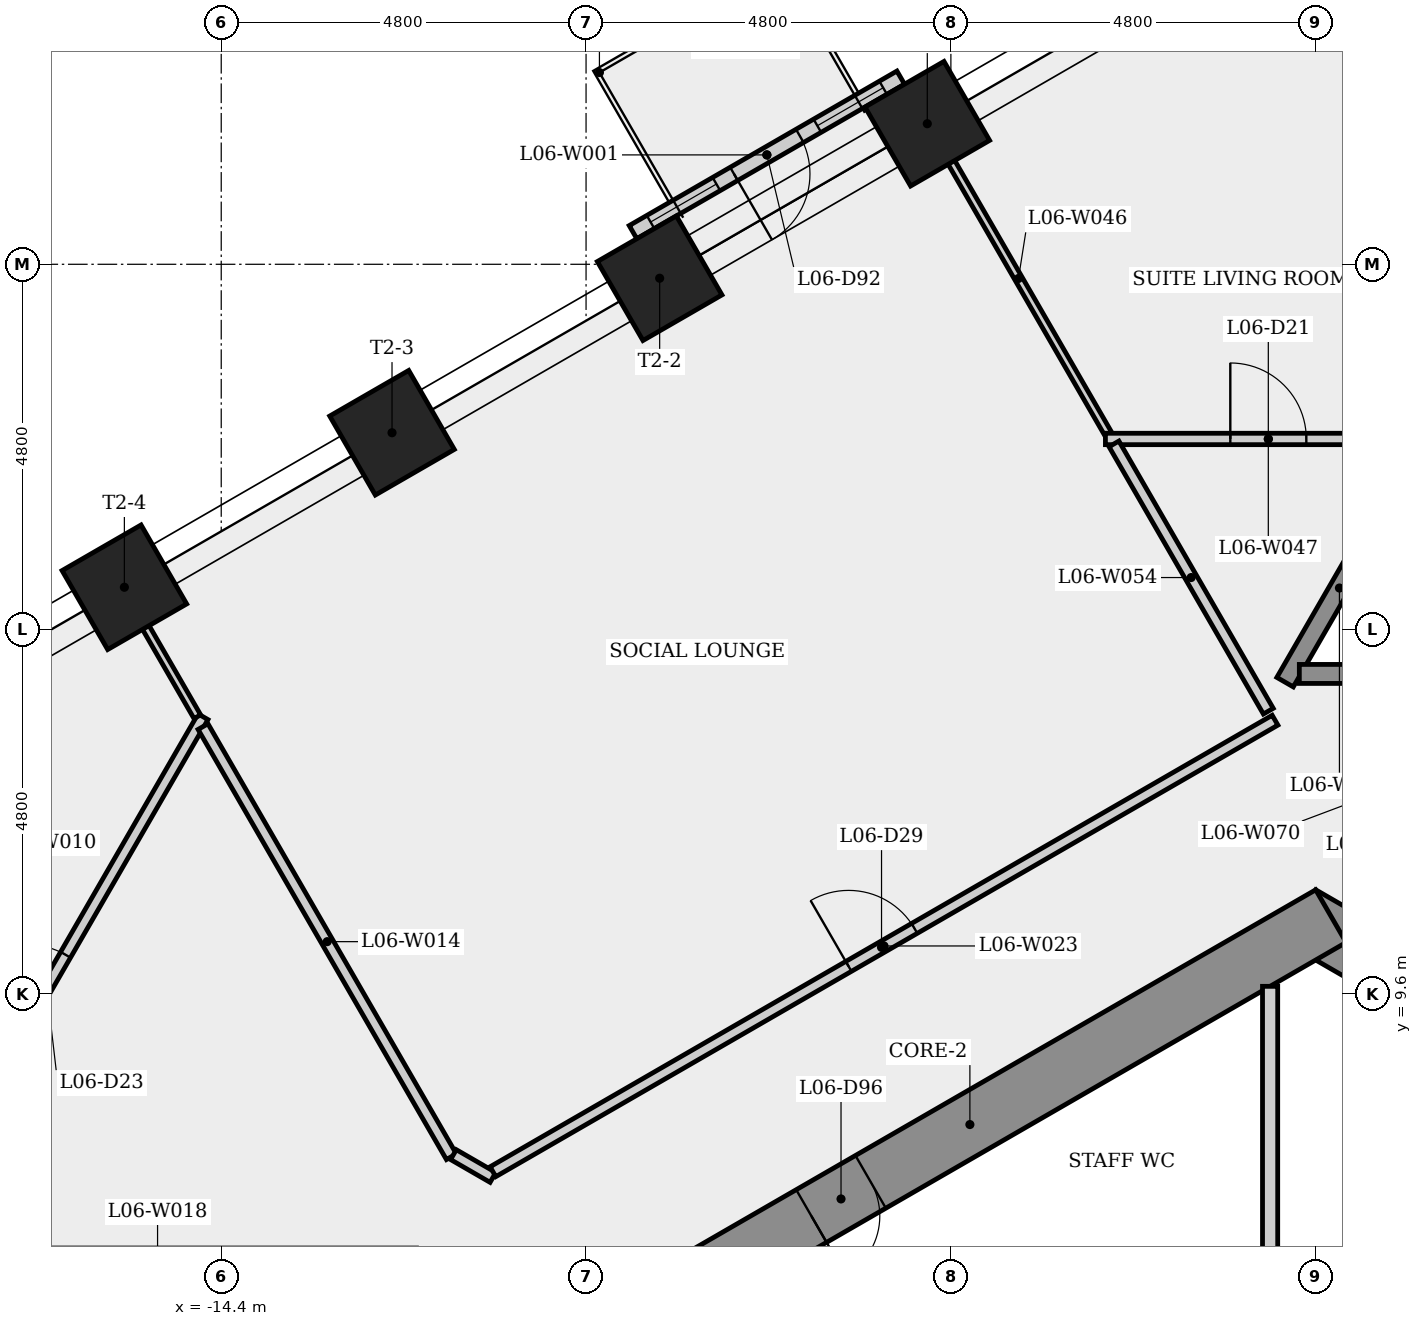
"""IFC4 building model, lengths in metres.
Left out: names, types, materials, properties, quantities, classifications, styles, units other than length and angle.
Written with IfcOpenShell. Run it as: python <this file> out.ifc"""

import sys

from ifc_helpers import new_model, si_unit, direction, frame, frame_2d, origin, origin_2d, place, context, subcontext, project, spatial, rectangle, extrude, element, fill, save


model = new_model("IFC4")
c1 = context("Model", 3, precision=1e-05, world=origin(), true_north=direction((0.0, 1.0)))
c2 = subcontext(c1, "Body", "Model", "MODEL_VIEW")
j1 = project(units=[si_unit("LENGTHUNIT", "METRE"), si_unit("PLANEANGLEUNIT", "RADIAN")], contexts=[c1])
p1 = place(None, origin())
s1 = spatial("IfcSite", under=j1, at=p1, CompositionType="ELEMENT")
p2 = place(p1, origin())
s2 = spatial("IfcBuilding", under=s1, at=p2, CompositionType="ELEMENT")
p3 = place(p2, frame((0.0, 0.0, 28.9)))
s3 = spatial("IfcBuildingStorey", under=s2, at=p3, CompositionType="ELEMENT", Elevation=28.9)
p4 = place(p3, frame((9.3, 5.138, 0.0), z_axis=(0.0, 0.0, 1.0), x_axis=(-0.866023993627, 0.500002442456, 0.0)))
e1 = element("IfcWall", 1, at=p4, inside=s3, PredefinedType="SHEAR", context=c2, shape_type="SweptSolid", body=[
    extrude(rectangle(XDim=10.97, YDim=0.8, at=frame_2d((5.485, 0.0))), origin(), (0.0, 0.0, 1.0), 3.4),
])
p5 = place(p4, frame((5.509, 0.0, 0.0)))
e2 = element("IfcOpeningElement", 2, at=p5, cuts=e1, PredefinedType="OPENING", context=c2, shape_type="SweptSolid", body=[
    extrude(rectangle(XDim=0.9, YDim=2.1, at=frame_2d((0.45, 1.05))), frame((0.0, 0.41, 0.0), z_axis=(0.0, -1.0, 0.0), x_axis=(1.0, 0.0, 0.0)), (0.0, 0.0, 1.0), 0.82),
])
p6 = place(p3, frame((0.2, 10.623, 0.0), z_axis=(0.0, 0.0, 1.0), x_axis=(-0.866023993627, -0.500002442456, 0.0)))
e3 = element("IfcWall", 3, at=p6, inside=s3, PredefinedType="SHEAR", context=c2, shape_type="SweptSolid", body=[
    extrude(rectangle(XDim=10.97, YDim=0.8, at=frame_2d((5.485, 0.0))), origin(), (0.0, 0.0, 1.0), 3.4),
])
p7 = place(p6, frame((6.993, 0.0, 0.0)))
e4 = element("IfcOpeningElement", 4, at=p7, cuts=e3, PredefinedType="OPENING", context=c2, shape_type="SweptSolid", body=[
    extrude(rectangle(XDim=0.9, YDim=2.1, at=frame_2d((0.45, 1.05))), frame((0.0, 0.41, 0.0), z_axis=(0.0, -1.0, 0.0), x_axis=(1.0, 0.0, 0.0)), (0.0, 0.0, 1.0), 0.82),
])
for number, where, z_axis, x_axis in (
    (5, (-5.11, 21.05, 0.0), (0.0, 0.0, 1.0), (-0.5, 0.866, 0.0)),
    (6, (-8.632, 19.017, 0.0), (0.0, 0.0, 1.0), (-0.5, 0.866, 0.0)),
    (7, (-12.153, 16.983, 0.0), (0.0, 0.0, 1.0), (-0.5, 0.866, 0.0)),
    (8, (-15.674, 14.95, 0.0), (0.0, 0.0, 1.0), (-0.5, 0.866, 0.0)),
):
    element("IfcColumn", number, at=place(p3, frame(where, z_axis=z_axis, x_axis=x_axis)), inside=s3, PredefinedType="COLUMN", context=c2, shape_type="SweptSolid", body=[
        extrude(rectangle(XDim=1.2, YDim=1.2, at=origin_2d()), origin(), (0.0, 0.0, 1.0), 3.4),
    ])
p8 = place(p3, frame((-5.46, 21.656, 0.0), z_axis=(0.0, 0.0, 1.0), x_axis=(-0.866021634107, -0.500006529216, 0.0)))
e9 = element("IfcWall", 9, at=p8, inside=s3, PredefinedType="SOLIDWALL", context=c2, shape_type="SweptSolid", body=[
    extrude(rectangle(XDim=4.067, YDim=0.2, at=frame_2d((2.033, 0.0))), origin(), (0.0, 0.0, 1.0), 3.4),
])
p9 = place(p8, frame((1.533, 0.0, 0.0)))
e10 = element("IfcOpeningElement", 10, at=p9, cuts=e9, PredefinedType="OPENING", context=c2, shape_type="SweptSolid", body=[
    extrude(rectangle(XDim=1.0, YDim=2.4, at=frame_2d((0.5, 1.2))), frame((0.0, 0.11, 0.0), z_axis=(0.0, -1.0, 0.0), x_axis=(1.0, 0.0, 0.0)), (0.0, 0.0, 1.0), 0.22),
])
p10 = place(p8, frame((0.267, 0.0, 0.9)))
e11 = element("IfcOpeningElement", 11, at=p10, cuts=e9, PredefinedType="OPENING", context=c2, shape_type="SweptSolid", body=[
    extrude(rectangle(XDim=1.0, YDim=1.5, at=frame_2d((0.5, 0.75))), frame((0.0, 0.11, 0.0), z_axis=(0.0, -1.0, 0.0), x_axis=(1.0, 0.0, 0.0)), (0.0, 0.0, 1.0), 0.22),
])
p11 = place(p8, frame((2.8, 0.0, 0.9)))
e12 = element("IfcOpeningElement", 12, at=p11, cuts=e9, PredefinedType="OPENING", context=c2, shape_type="SweptSolid", body=[
    extrude(rectangle(XDim=1.0, YDim=1.5, at=frame_2d((0.5, 0.75))), frame((0.0, 0.11, 0.0), z_axis=(0.0, -1.0, 0.0), x_axis=(1.0, 0.0, 0.0)), (0.0, 0.0, 1.0), 0.22),
])
p12 = place(p3, frame((-18.756, 6.116, 0.0), z_axis=(0.0, 0.0, 1.0), x_axis=(0.500020193662, 0.866013744654, 0.0)))
e13 = element("IfcWall", 13, at=p12, inside=s3, PredefinedType="PARTITIONING", context=c2, shape_type="SweptSolid", body=[
    extrude(rectangle(XDim=8.234, YDim=0.15, at=frame_2d((4.117, 0.0))), origin(), (0.0, 0.0, 1.0), 3.05),
])
p13 = place(p12, frame((3.617, 0.0, 0.0)))
e14 = element("IfcOpeningElement", 14, at=p13, cuts=e13, PredefinedType="OPENING", context=c2, shape_type="SweptSolid", body=[
    extrude(rectangle(XDim=1.0, YDim=2.1, at=frame_2d((0.5, 1.05))), frame((0.0, 0.085, 0.0), z_axis=(0.0, -1.0, 0.0), x_axis=(1.0, 0.0, 0.0)), (0.0, 0.0, 1.0), 0.17),
])
p14 = place(p3, frame((-15.692, 14.94, 0.0), z_axis=(0.0, 0.0, 1.0), x_axis=(0.499953038101, -0.866052515552, 0.0)))
e15 = element("IfcWall", 15, at=p14, inside=s3, PredefinedType="PARTITIONING", context=c2, shape_type="SweptSolid", body=[
    extrude(rectangle(XDim=1.955, YDim=0.1, at=frame_2d((0.978, 0.0))), origin(), (0.0, 0.0, 1.0), 3.05),
])
p15 = place(p3, frame((-14.639, 13.117, 0.0), z_axis=(0.0, 0.0, 1.0), x_axis=(0.500000581714, -0.866025067932, 0.0)))
e16 = element("IfcWall", 16, at=p15, inside=s3, PredefinedType="PARTITIONING", context=c2, shape_type="SweptSolid", body=[
    extrude(rectangle(XDim=6.535, YDim=0.15, at=frame_2d((3.267, 0.0))), origin(), (0.0, 0.0, 1.0), 3.05),
])
p16 = place(p3, frame((-11.344, 7.485, 0.0), z_axis=(0.0, 0.0, 1.0), x_axis=(0.866131372301, -0.499816412211, 0.0)))
e17 = element("IfcWall", 17, at=p16, inside=s3, PredefinedType="PARTITIONING", context=c2, shape_type="SweptSolid", body=[
    extrude(rectangle(XDim=0.6, YDim=0.15, at=frame_2d((0.3, 0.0))), origin(), (0.0, 0.0, 1.0), 3.05),
])
p17 = place(p3, frame((-10.825, 7.26, 0.0), z_axis=(0.0, 0.0, 1.0), x_axis=(0.866026819738, 0.499997547488, 0.0)))
e18 = element("IfcWall", 18, at=p17, inside=s3, PredefinedType="PARTITIONING", context=c2, shape_type="SweptSolid", body=[
    extrude(rectangle(XDim=11.882, YDim=0.15, at=frame_2d((5.941, 0.0))), origin(), (0.0, 0.0, 1.0), 3.05),
])
p18 = place(p17, frame((5.403, 0.0, 0.0)))
e19 = element("IfcOpeningElement", 19, at=p18, cuts=e18, PredefinedType="OPENING", context=c2, shape_type="SweptSolid", body=[
    extrude(rectangle(XDim=1.0, YDim=2.1, at=frame_2d((0.5, 1.05))), frame((0.0, 0.085, 0.0), z_axis=(0.0, -1.0, 0.0), x_axis=(1.0, 0.0, 0.0)), (0.0, 0.0, 1.0), 0.17),
])
p19 = place(p3, frame((-2.729, 16.967, 0.0), z_axis=(0.0, 0.0, 1.0), x_axis=(-0.500005632288, 0.866022151957, 0.0)))
e20 = element("IfcWall", 20, at=p19, inside=s3, PredefinedType="PARTITIONING", context=c2, shape_type="SweptSolid", body=[
    extrude(rectangle(XDim=4.727, YDim=0.1, at=frame_2d((2.363, 0.0))), origin(), (0.0, 0.0, 1.0), 3.05),
])
p20 = place(p3, frame((-2.767, 16.902, 0.0), z_axis=(0.0, 0.0, 1.0), x_axis=(1.0, 0.0, 0.0)))
e21 = element("IfcWall", 21, at=p20, inside=s3, PredefinedType="PARTITIONING", context=c2, shape_type="SweptSolid", body=[
    extrude(rectangle(XDim=4.286, YDim=0.15, at=frame_2d((2.143, 0.0))), origin(), (0.0, 0.0, 1.0), 3.05),
])
p21 = place(p20, frame((1.643, 0.0, 0.0)))
e22 = element("IfcOpeningElement", 22, at=p21, cuts=e21, PredefinedType="OPENING", context=c2, shape_type="SweptSolid", body=[
    extrude(rectangle(XDim=1.0, YDim=2.1, at=frame_2d((0.5, 1.05))), frame((0.0, 0.085, 0.0), z_axis=(0.0, -1.0, 0.0), x_axis=(1.0, 0.0, 0.0)), (0.0, 0.0, 1.0), 0.17),
])
p22 = place(p3, frame((-0.624, 13.32, 0.0), z_axis=(0.0, 0.0, 1.0), x_axis=(-0.499986114097, 0.866033420666, 0.0)))
e23 = element("IfcWall", 23, at=p22, inside=s3, PredefinedType="PARTITIONING", context=c2, shape_type="SweptSolid", body=[
    extrude(rectangle(XDim=4.061, YDim=0.15, at=frame_2d((2.031, 0.0))), origin(), (0.0, 0.0, 1.0), 3.05),
])
p23 = place(p3, frame((-0.6, 9.699, 0.0), z_axis=(0.0, 0.0, 1.0), x_axis=(0.0, -1.0, 0.0)))
e24 = element("IfcWall", 24, at=p23, inside=s3, PredefinedType="PARTITIONING", context=c2, shape_type="SweptSolid", body=[
    extrude(rectangle(XDim=4.425, YDim=0.2, at=frame_2d((2.212, 0.0))), origin(), (0.0, 0.0, 1.0), 3.05),
])
p24 = place(p3, frame((-0.403, 13.702, 0.0), z_axis=(0.0, 0.0, 1.0), x_axis=(0.499976111731, 0.866039195244, 0.0)))
e25 = element("IfcWall", 25, at=p24, inside=s3, PredefinedType="SHEAR", context=c2, shape_type="SweptSolid", body=[
    extrude(rectangle(XDim=2.861, YDim=0.25, at=frame_2d((1.43, 0.0))), origin(), (0.0, 0.0, 1.0), 3.05),
])
p25 = place(p3, frame((0.475, 13.81, 0.0), z_axis=(0.0, 0.0, 1.0), x_axis=(-1.0, 0.0, 0.0)))
e26 = element("IfcWall", 26, at=p25, inside=s3, PredefinedType="SHEAR", context=c2, shape_type="SweptSolid", body=[
    extrude(rectangle(XDim=0.691, YDim=0.25, at=frame_2d((0.345, 0.0))), origin(), (0.0, 0.0, 1.0), 3.4),
])
p26 = place(p9, origin())
e27 = element("IfcDoor", 27, at=p26, inside=s3, OperationType="SINGLE_SWING_RIGHT", PredefinedType="DOOR", context=c2, shape_type="SweptSolid", body=[
    extrude(rectangle(XDim=1.0, YDim=2.4, at=frame_2d((0.5, 1.2))), frame((0.0, 0.025, 0.0), z_axis=(0.0, -1.0, 0.0), x_axis=(1.0, 0.0, 0.0)), (0.0, 0.0, 1.0), 0.05),
])
fill(e10, e27)
p27 = place(p10, origin())
e28 = element("IfcWindow", 28, at=p27, inside=s3, PartitioningType="SINGLE_PANEL", PredefinedType="WINDOW", context=c2, shape_type="SweptSolid", body=[
    extrude(rectangle(XDim=1.0, YDim=1.5, at=frame_2d((0.5, 0.75))), frame((0.0, 0.03, 0.0), z_axis=(0.0, -1.0, 0.0), x_axis=(1.0, 0.0, 0.0)), (0.0, 0.0, 1.0), 0.06),
])
fill(e11, e28)
p28 = place(p11, origin())
e29 = element("IfcWindow", 29, at=p28, inside=s3, PartitioningType="SINGLE_PANEL", PredefinedType="WINDOW", context=c2, shape_type="SweptSolid", body=[
    extrude(rectangle(XDim=1.0, YDim=1.5, at=frame_2d((0.5, 0.75))), frame((0.0, 0.03, 0.0), z_axis=(0.0, -1.0, 0.0), x_axis=(1.0, 0.0, 0.0)), (0.0, 0.0, 1.0), 0.06),
])
fill(e12, e29)
p29 = place(p21, origin())
e30 = element("IfcDoor", 30, at=p29, inside=s3, OperationType="SINGLE_SWING_LEFT", PredefinedType="DOOR", context=c2, shape_type="SweptSolid", body=[
    extrude(rectangle(XDim=1.0, YDim=2.1, at=frame_2d((0.5, 1.05))), frame((0.0, 0.025, 0.0), z_axis=(0.0, -1.0, 0.0), x_axis=(1.0, 0.0, 0.0)), (0.0, 0.0, 1.0), 0.05),
])
fill(e22, e30)
p30 = place(p13, origin())
e31 = element("IfcDoor", 31, at=p30, inside=s3, OperationType="SINGLE_SWING_LEFT", PredefinedType="DOOR", context=c2, shape_type="SweptSolid", body=[
    extrude(rectangle(XDim=1.0, YDim=2.1, at=frame_2d((0.5, 1.05))), frame((0.0, 0.025, 0.0), z_axis=(0.0, -1.0, 0.0), x_axis=(1.0, 0.0, 0.0)), (0.0, 0.0, 1.0), 0.05),
])
fill(e14, e31)
p31 = place(p18, origin())
e32 = element("IfcDoor", 32, at=p31, inside=s3, OperationType="SINGLE_SWING_LEFT", PredefinedType="DOOR", context=c2, shape_type="SweptSolid", body=[
    extrude(rectangle(XDim=1.0, YDim=2.1, at=frame_2d((0.5, 1.05))), frame((0.0, 0.025, 0.0), z_axis=(0.0, -1.0, 0.0), x_axis=(1.0, 0.0, 0.0)), (0.0, 0.0, 1.0), 0.05),
])
fill(e19, e32)
p32 = place(p7, origin())
e33 = element("IfcDoor", 33, at=p32, inside=s3, OperationType="SINGLE_SWING_RIGHT", PredefinedType="DOOR", context=c2, shape_type="SweptSolid", body=[
    extrude(rectangle(XDim=0.9, YDim=2.1, at=frame_2d((0.45, 1.05))), frame((0.0, 0.025, 0.0), z_axis=(0.0, -1.0, 0.0), x_axis=(1.0, 0.0, 0.0)), (0.0, 0.0, 1.0), 0.05),
])
fill(e4, e33)
save(model, sys.argv[1])
